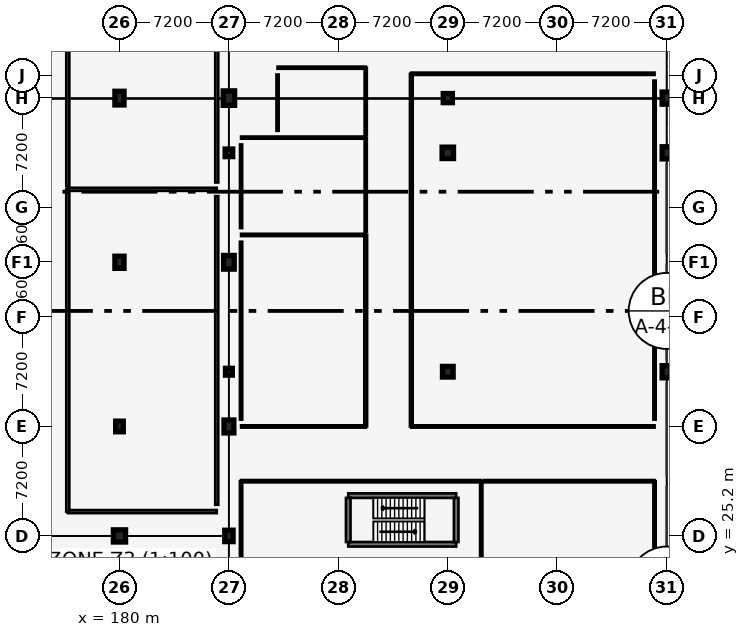
"""IFC4 building model, lengths in metres.
Left out: names, types, materials, properties, quantities, classifications, styles, units other than length and angle.
Written with IfcOpenShell. Run it as: python <this file> out.ifc"""

import sys

from ifc_helpers import new_model, si_unit, direction, frame, frame_2d, origin, origin_2d, place, context, subcontext, project, spatial, rectangle, extrude, element, fill, save


model = new_model("IFC4")
c1 = context("Model", 3, precision=1e-05, world=origin(), true_north=direction((0.0, 1.0)))
c2 = subcontext(c1, "Body", "Model", "MODEL_VIEW")
j1 = project(units=[si_unit("LENGTHUNIT", "METRE"), si_unit("PLANEANGLEUNIT", "RADIAN")], contexts=[c1])
p1 = place(None, origin())
s1 = spatial("IfcSite", under=j1, at=p1, CompositionType="ELEMENT")
p2 = place(p1, origin())
s2 = spatial("IfcBuilding", under=s1, at=p2, CompositionType="ELEMENT")
p3 = place(p2, origin())
s3 = spatial("IfcBuildingStorey", under=s2, at=p3, CompositionType="ELEMENT", Elevation=0.0)
p4 = place(p3, frame((180.0, 25.2, 0.0), z_axis=(0.0, 0.0, 1.0), x_axis=(1.0, 0.0, 0.0)))
e1 = element("IfcColumn", 1, at=p4, inside=s3, PredefinedType="COLUMN", context=c2, shape_type="SweptSolid", body=[
    extrude(rectangle(XDim=0.8, YDim=0.8, at=origin_2d()), origin(), (0.0, 0.0, 1.0), 4.8),
])
p5 = place(p3, frame((180.0, 32.4, 0.0), z_axis=(0.0, 0.0, 1.0), x_axis=(1.0, 0.0, 0.0)))
e2 = element("IfcColumn", 2, at=p5, inside=s3, PredefinedType="COLUMN", context=c2, shape_type="SweptSolid", body=[
    extrude(rectangle(XDim=0.5, YDim=0.7, at=origin_2d()), origin(), (0.0, 0.0, 1.0), 4.8),
])
p6 = place(p3, frame((180.0, 43.2, 0.0), z_axis=(0.0, 0.0, 1.0), x_axis=(1.0, 0.0, 0.0)))
e3 = element("IfcColumn", 3, at=p6, inside=s3, PredefinedType="COLUMN", context=c2, shape_type="SweptSolid", body=[
    extrude(rectangle(XDim=0.6, YDim=0.8, at=origin_2d()), origin(), (0.0, 0.0, 1.0), 4.8),
])
p7 = place(p3, frame((180.0, 54.0, 0.0), z_axis=(0.0, 0.0, 1.0), x_axis=(1.0, 0.0, 0.0)))
e4 = element("IfcColumn", 4, at=p7, inside=s3, PredefinedType="COLUMN", context=c2, shape_type="SweptSolid", body=[
    extrude(rectangle(XDim=0.6, YDim=0.9, at=origin_2d()), origin(), (0.0, 0.0, 1.0), 4.8),
])
p8 = place(p3, frame((187.2, 25.2, 0.0), z_axis=(0.0, 0.0, 1.0), x_axis=(1.0, 0.0, 0.0)))
e5 = element("IfcColumn", 5, at=p8, inside=s3, PredefinedType="COLUMN", context=c2, shape_type="SweptSolid", body=[
    extrude(rectangle(XDim=0.55, YDim=0.75, at=origin_2d()), origin(), (0.0, 0.0, 1.0), 4.8),
])
p9 = place(p3, frame((187.2, 32.4, 0.0), z_axis=(0.0, 0.0, 1.0), x_axis=(1.0, 0.0, 0.0)))
e6 = element("IfcColumn", 6, at=p9, inside=s3, PredefinedType="COLUMN", context=c2, shape_type="SweptSolid", body=[
    extrude(rectangle(XDim=0.65, YDim=0.85, at=origin_2d()), origin(), (0.0, 0.0, 1.0), 4.8),
])
p10 = place(p3, frame((187.2, 36.0, 0.0), z_axis=(0.0, 0.0, 1.0), x_axis=(1.0, 0.0, 0.0)))
e7 = element("IfcColumn", 7, at=p10, inside=s3, PredefinedType="COLUMN", context=c2, shape_type="SweptSolid", body=[
    extrude(rectangle(XDim=0.45, YDim=0.45, at=origin_2d()), origin(), (0.0, 0.0, 1.0), 4.8),
])
p11 = place(p3, frame((187.2, 43.2, 0.0), z_axis=(0.0, 0.0, 1.0), x_axis=(1.0, 0.0, 0.0)))
e8 = element("IfcColumn", 8, at=p11, inside=s3, PredefinedType="COLUMN", context=c2, shape_type="SweptSolid", body=[
    extrude(rectangle(XDim=0.7, YDim=0.9, at=origin_2d()), origin(), (0.0, 0.0, 1.0), 4.8),
])
p12 = place(p3, frame((187.2, 50.4, 0.0), z_axis=(0.0, 0.0, 1.0), x_axis=(1.0, 0.0, 0.0)))
e9 = element("IfcColumn", 9, at=p12, inside=s3, PredefinedType="COLUMN", context=c2, shape_type="SweptSolid", body=[
    extrude(rectangle(XDim=0.5, YDim=0.5, at=origin_2d()), origin(), (0.0, 0.0, 1.0), 4.8),
])
p13 = place(p3, frame((187.2, 54.0, 0.0), z_axis=(0.0, 0.0, 1.0), x_axis=(1.0, 0.0, 0.0)))
e10 = element("IfcColumn", 10, at=p13, inside=s3, PredefinedType="COLUMN", context=c2, shape_type="SweptSolid", body=[
    extrude(rectangle(XDim=0.75, YDim=0.95, at=origin_2d()), origin(), (0.0, 0.0, 1.0), 4.8),
])
p14 = place(p3, frame((201.6, 36.0, 0.0), z_axis=(0.0, 0.0, 1.0), x_axis=(1.0, 0.0, 0.0)))
e11 = element("IfcColumn", 11, at=p14, inside=s3, PredefinedType="COLUMN", context=c2, shape_type="SweptSolid", body=[
    extrude(rectangle(XDim=0.7, YDim=0.7, at=origin_2d()), origin(), (0.0, 0.0, 1.0), 4.8),
])
p15 = place(p3, frame((201.6, 50.4, 0.0), z_axis=(0.0, 0.0, 1.0), x_axis=(1.0, 0.0, 0.0)))
e12 = element("IfcColumn", 12, at=p15, inside=s3, PredefinedType="COLUMN", context=c2, shape_type="SweptSolid", body=[
    extrude(rectangle(XDim=0.75, YDim=0.75, at=origin_2d()), origin(), (0.0, 0.0, 1.0), 4.8),
])
p16 = place(p3, frame((201.6, 54.0, 0.0), z_axis=(0.0, 0.0, 1.0), x_axis=(1.0, 0.0, 0.0)))
e13 = element("IfcColumn", 13, at=p16, inside=s3, PredefinedType="COLUMN", context=c2, shape_type="SweptSolid", body=[
    extrude(rectangle(XDim=0.6, YDim=0.6, at=origin_2d()), origin(), (0.0, 0.0, 1.0), 4.8),
])
for number, where, z_axis, x_axis in (
    (14, (216.0, 36.0, 0.0), (0.0, 0.0, 1.0), (1.0, 0.0, 0.0)),
    (15, (216.0, 50.4, 0.0), (0.0, 0.0, 1.0), (1.0, 0.0, 0.0)),
    (16, (216.0, 54.0, 0.0), (0.0, 0.0, 1.0), (1.0, 0.0, 0.0)),
):
    element("IfcColumn", number, at=place(p3, frame(where, z_axis=z_axis, x_axis=x_axis)), inside=s3, PredefinedType="COLUMN", context=c2, shape_type="SweptSolid", body=[
        extrude(rectangle(XDim=0.6, YDim=0.8, at=origin_2d()), origin(), (0.0, 0.0, 1.0), 4.8),
    ])
p17 = place(p3, frame((195.05, 24.65, 0.0), z_axis=(0.0, 0.0, 1.0), x_axis=(1.0, 0.0, 0.0)))
e17 = element("IfcWall", 17, at=p17, inside=s3, PredefinedType="SHEAR", context=c2, shape_type="SweptSolid", body=[
    extrude(rectangle(XDim=7.1, YDim=0.3, at=frame_2d((3.55, 0.0))), origin(), (0.0, 0.0, 1.0), 4.55),
])
p18 = place(p3, frame((202.15, 27.85, 0.0), z_axis=(0.0, 0.0, 1.0), x_axis=(-1.0, 0.0, 0.0)))
e18 = element("IfcWall", 18, at=p18, inside=s3, PredefinedType="SHEAR", context=c2, shape_type="SweptSolid", body=[
    extrude(rectangle(XDim=7.1, YDim=0.3, at=frame_2d((3.55, 0.0))), origin(), (0.0, 0.0, 1.0), 4.55),
])
p19 = place(p18, frame((5.6, 0.0, 0.0)))
e19 = element("IfcOpeningElement", 19, at=p19, cuts=e18, PredefinedType="OPENING", context=c2, shape_type="SweptSolid", body=[
    extrude(rectangle(XDim=1.05, YDim=2.15, at=frame_2d((0.525, 1.075))), frame((0.0, 0.16, 0.0), z_axis=(0.0, -1.0, 0.0), x_axis=(1.0, 0.0, 0.0)), (0.0, 0.0, 1.0), 0.32),
])
for number, where, z_axis, x_axis in (
    (20, (202.15, 24.8, 0.0), (0.0, 0.0, 1.0), (0.0, 1.0, 0.0)),
    (21, (195.05, 27.7, 0.0), (0.0, 0.0, 1.0), (0.0, -1.0, 0.0)),
):
    element("IfcWall", number, at=place(p3, frame(where, z_axis=z_axis, x_axis=x_axis)), inside=s3, PredefinedType="SHEAR", context=c2, shape_type="SweptSolid", body=[
        extrude(rectangle(XDim=2.9, YDim=0.3, at=frame_2d((1.45, 0.0))), origin(), (0.0, 0.0, 1.0), 4.55),
    ])
p20 = place(p3, frame((176.6, 48.0, 0.0), z_axis=(0.0, 0.0, 1.0), x_axis=(1.0, 0.0, 0.0)))
e22 = element("IfcWall", 22, at=p20, inside=s3, PredefinedType="SOLIDWALL", context=c2, shape_type="SweptSolid", body=[
    extrude(rectangle(XDim=9.8, YDim=0.2, at=frame_2d((4.9, 0.0))), origin(), (0.0, 0.0, 1.0), 4.0),
])
p21 = place(p3, frame((186.4, 26.8, 0.0), z_axis=(0.0, 0.0, 1.0), x_axis=(-1.0, 0.0, 0.0)))
e23 = element("IfcWall", 23, at=p21, inside=s3, PredefinedType="SOLIDWALL", context=c2, shape_type="SweptSolid", body=[
    extrude(rectangle(XDim=9.8, YDim=0.2, at=frame_2d((4.9, 0.0))), origin(), (0.0, 0.0, 1.0), 3.557),
])
p22 = place(p3, frame((186.4, 27.25, 0.0), z_axis=(0.0, 0.0, 1.0), x_axis=(0.0, 1.0, 0.0)))
e24 = element("IfcWall", 24, at=p22, inside=s3, PredefinedType="SOLIDWALL", context=c2, shape_type="SweptSolid", body=[
    extrude(rectangle(XDim=20.3, YDim=0.2, at=frame_2d((10.15, 0.0))), origin(), (0.0, 0.0, 1.0), 3.657),
])
p23 = place(p3, frame((176.6, 48.0, 0.0), z_axis=(0.0, 0.0, 1.0), x_axis=(0.0, -1.0, 0.0)))
e25 = element("IfcWall", 25, at=p23, inside=s3, PredefinedType="SOLIDWALL", context=c2, shape_type="SweptSolid", body=[
    extrude(rectangle(XDim=21.2, YDim=0.2, at=frame_2d((10.6, 0.0))), origin(), (0.0, 0.0, 1.0), 3.757),
])
p24 = place(p23, frame((9.7, 0.0, 0.0)))
e26 = element("IfcOpeningElement", 26, at=p24, cuts=e25, PredefinedType="OPENING", context=c2, shape_type="SweptSolid", body=[
    extrude(rectangle(XDim=1.8, YDim=2.2, at=frame_2d((0.9, 1.1))), frame((0.0, 0.11, 0.0), z_axis=(0.0, -1.0, 0.0), x_axis=(1.0, 0.0, 0.0)), (0.0, 0.0, 1.0), 0.22),
])
p25 = place(p3, frame((186.4, 48.45, 0.0), z_axis=(0.0, 0.0, 1.0), x_axis=(0.0, 1.0, 0.0)))
e27 = element("IfcWall", 27, at=p25, inside=s3, PredefinedType="SOLIDWALL", context=c2, shape_type="SweptSolid", body=[
    extrude(rectangle(XDim=14.9, YDim=0.2, at=frame_2d((7.45, 0.0))), origin(), (0.0, 0.0, 1.0), 4.0),
])
p26 = place(p3, frame((176.6, 63.8, 0.0), z_axis=(0.0, 0.0, 1.0), x_axis=(0.0, -1.0, 0.0)))
e28 = element("IfcWall", 28, at=p26, inside=s3, PredefinedType="SOLIDWALL", context=c2, shape_type="SweptSolid", body=[
    extrude(rectangle(XDim=15.6, YDim=0.2, at=frame_2d((7.8, 0.0))), origin(), (0.0, 0.0, 1.0), 4.0),
])
p27 = place(p26, frame((6.9, 0.0, 0.0)))
e29 = element("IfcOpeningElement", 29, at=p27, cuts=e28, PredefinedType="OPENING", context=c2, shape_type="SweptSolid", body=[
    extrude(rectangle(XDim=1.8, YDim=2.2, at=frame_2d((0.9, 1.1))), frame((0.0, 0.11, 0.0), z_axis=(0.0, -1.0, 0.0), x_axis=(1.0, 0.0, 0.0)), (0.0, 0.0, 1.0), 0.22),
])
for number, where, z_axis, x_axis in (
    (30, (203.8, 8.45, 0.0), (0.0, 0.0, 1.0), (0.0, 1.0, 0.0)),
    (31, (188.0, 28.8, 0.0), (0.0, 0.0, 1.0), (0.0, -1.0, 0.0)),
):
    element("IfcWall", number, at=place(p3, frame(where, z_axis=z_axis, x_axis=x_axis)), inside=s3, PredefinedType="PARTITIONING", context=c2, shape_type="SweptSolid", body=[
        extrude(rectangle(XDim=20.35, YDim=0.15, at=frame_2d((10.175, 0.0))), origin(), (0.0, 0.0, 1.0), 3.92),
    ])
p28 = place(p3, frame((188.0, 28.8, 0.0), z_axis=(0.0, 0.0, 1.0), x_axis=(1.0, 0.0, 0.0)))
e32 = element("IfcWall", 32, at=p28, inside=s3, PredefinedType="PARTITIONING", context=c2, shape_type="SweptSolid", body=[
    extrude(rectangle(XDim=15.8, YDim=0.15, at=frame_2d((7.9, 0.0))), origin(), (0.0, 0.0, 1.0), 4.1),
])
p29 = place(p28, frame((7.0, 0.0, 0.0)))
e33 = element("IfcOpeningElement", 33, at=p29, cuts=e32, PredefinedType="OPENING", context=c2, shape_type="SweptSolid", body=[
    extrude(rectangle(XDim=1.8, YDim=2.2, at=frame_2d((0.9, 1.1))), frame((0.0, 0.085, 0.0), z_axis=(0.0, -1.0, 0.0), x_axis=(1.0, 0.0, 0.0)), (0.0, 0.0, 1.0), 0.17),
])
p30 = place(p3, frame((215.2, 8.45, 0.0), z_axis=(0.0, 0.0, 1.0), x_axis=(0.0, 1.0, 0.0)))
e34 = element("IfcWall", 34, at=p30, inside=s3, PredefinedType="PARTITIONING", context=c2, shape_type="SweptSolid", body=[
    extrude(rectangle(XDim=20.35, YDim=0.15, at=frame_2d((10.175, 0.0))), origin(), (0.0, 0.0, 1.0), 3.92),
])
p31 = place(p3, frame((204.0, 28.8, 0.0), z_axis=(0.0, 0.0, 1.0), x_axis=(1.0, 0.0, 0.0)))
e35 = element("IfcWall", 35, at=p31, inside=s3, PredefinedType="PARTITIONING", context=c2, shape_type="SweptSolid", body=[
    extrude(rectangle(XDim=11.2, YDim=0.15, at=frame_2d((5.6, 0.0))), origin(), (0.0, 0.0, 1.0), 4.1),
])
p32 = place(p31, frame((4.7, 0.0, 0.0)))
e36 = element("IfcOpeningElement", 36, at=p32, cuts=e35, PredefinedType="OPENING", context=c2, shape_type="SweptSolid", body=[
    extrude(rectangle(XDim=1.8, YDim=2.2, at=frame_2d((0.9, 1.1))), frame((0.0, 0.085, 0.0), z_axis=(0.0, -1.0, 0.0), x_axis=(1.0, 0.0, 0.0)), (0.0, 0.0, 1.0), 0.17),
])
p33 = place(p3, frame((199.2, 55.6, 0.0), z_axis=(0.0, 0.0, 1.0), x_axis=(1.0, 0.0, 0.0)))
e37 = element("IfcWall", 37, at=p33, inside=s3, PredefinedType="PARTITIONING", context=c2, shape_type="SweptSolid", body=[
    extrude(rectangle(XDim=16.0, YDim=0.15, at=frame_2d((8.0, 0.0))), origin(), (0.0, 0.0, 1.0), 3.882),
])
p34 = place(p3, frame((215.2, 32.4, 0.0), z_axis=(0.0, 0.0, 1.0), x_axis=(-1.0, 0.0, 0.0)))
e38 = element("IfcWall", 38, at=p34, inside=s3, PredefinedType="PARTITIONING", context=c2, shape_type="SweptSolid", body=[
    extrude(rectangle(XDim=16.0, YDim=0.15, at=frame_2d((8.0, 0.0))), origin(), (0.0, 0.0, 1.0), 4.1),
])
p35 = place(p3, frame((215.2, 32.85, 0.0), z_axis=(0.0, 0.0, 1.0), x_axis=(0.0, 1.0, 0.0)))
e39 = element("IfcWall", 39, at=p35, inside=s3, PredefinedType="PARTITIONING", context=c2, shape_type="SweptSolid", body=[
    extrude(rectangle(XDim=22.3, YDim=0.15, at=frame_2d((11.15, 0.0))), origin(), (0.0, 0.0, 1.0), 3.92),
])
p36 = place(p3, frame((199.2, 55.6, 0.0), z_axis=(0.0, 0.0, 1.0), x_axis=(0.0, -1.0, 0.0)))
e40 = element("IfcWall", 40, at=p36, inside=s3, PredefinedType="SOLIDWALL", context=c2, shape_type="SweptSolid", body=[
    extrude(rectangle(XDim=23.2, YDim=0.18, at=frame_2d((11.6, 0.0))), origin(), (0.0, 0.0, 1.0), 3.92),
])
p37 = place(p36, frame((11.1, 0.0, 0.0)))
e41 = element("IfcOpeningElement", 41, at=p37, cuts=e40, PredefinedType="OPENING", context=c2, shape_type="SweptSolid", body=[
    extrude(rectangle(XDim=1.0, YDim=2.15, at=frame_2d((0.5, 1.075))), frame((0.0, 0.1, 0.0), z_axis=(0.0, -1.0, 0.0), x_axis=(1.0, 0.0, 0.0)), (0.0, 0.0, 1.0), 0.2),
])
for number, where, z_axis, x_axis in (
    (42, (188.0, 45.0, 0.0), (0.0, 0.0, 1.0), (1.0, 0.0, 0.0)),
    (43, (196.2, 32.4, 0.0), (0.0, 0.0, 1.0), (-1.0, 0.0, 0.0)),
):
    element("IfcWall", number, at=place(p3, frame(where, z_axis=z_axis, x_axis=x_axis)), inside=s3, PredefinedType="PARTITIONING", context=c2, shape_type="SweptSolid", body=[
        extrude(rectangle(XDim=8.2, YDim=0.15, at=frame_2d((4.1, 0.0))), origin(), (0.0, 0.0, 1.0), 4.1),
    ])
p38 = place(p3, frame((188.0, 44.55, 0.0), z_axis=(0.0, 0.0, 1.0), x_axis=(0.0, -1.0, 0.0)))
e44 = element("IfcWall", 44, at=p38, inside=s3, PredefinedType="PARTITIONING", context=c2, shape_type="SweptSolid", body=[
    extrude(rectangle(XDim=11.7, YDim=0.15, at=frame_2d((5.85, 0.0))), origin(), (0.0, 0.0, 1.0), 3.92),
])
p39 = place(p3, frame((196.2, 32.4, 0.0), z_axis=(0.0, 0.0, 1.0), x_axis=(0.0, 1.0, 0.0)))
e45 = element("IfcWall", 45, at=p39, inside=s3, PredefinedType="SOLIDWALL", context=c2, shape_type="SweptSolid", body=[
    extrude(rectangle(XDim=12.6, YDim=0.18, at=frame_2d((6.3, 0.0))), origin(), (0.0, 0.0, 1.0), 3.92),
])
p40 = place(p39, frame((5.79, 0.0, 0.0)))
e46 = element("IfcOpeningElement", 46, at=p40, cuts=e45, PredefinedType="OPENING", context=c2, shape_type="SweptSolid", body=[
    extrude(rectangle(XDim=1.02, YDim=2.15, at=frame_2d((0.51, 1.075))), frame((0.0, 0.1, 0.0), z_axis=(0.0, -1.0, 0.0), x_axis=(1.0, 0.0, 0.0)), (0.0, 0.0, 1.0), 0.2),
])
p41 = place(p3, frame((188.0, 51.4, 0.0), z_axis=(0.0, 0.0, 1.0), x_axis=(1.0, 0.0, 0.0)))
e47 = element("IfcWall", 47, at=p41, inside=s3, PredefinedType="PARTITIONING", context=c2, shape_type="SweptSolid", body=[
    extrude(rectangle(XDim=8.2, YDim=0.14, at=frame_2d((4.1, 0.0))), origin(), (0.0, 0.0, 1.0), 3.8),
])
p42 = place(p3, frame((188.0, 50.95, 0.0), z_axis=(0.0, 0.0, 1.0), x_axis=(0.0, -1.0, 0.0)))
e48 = element("IfcWall", 48, at=p42, inside=s3, PredefinedType="PARTITIONING", context=c2, shape_type="SweptSolid", body=[
    extrude(rectangle(XDim=5.5, YDim=0.14, at=frame_2d((2.75, 0.0))), origin(), (0.0, 0.0, 1.0), 3.8),
])
p43 = place(p3, frame((196.2, 45.2, 0.0), z_axis=(0.0, 0.0, 1.0), x_axis=(0.0, 1.0, 0.0)))
e49 = element("IfcWall", 49, at=p43, inside=s3, PredefinedType="PARTITIONING", context=c2, shape_type="SweptSolid", body=[
    extrude(rectangle(XDim=6.2, YDim=0.14, at=frame_2d((3.1, 0.0))), origin(), (0.0, 0.0, 1.0), 3.8),
])
p44 = place(p43, frame((2.61, 0.0, 0.0)))
e50 = element("IfcOpeningElement", 50, at=p44, cuts=e49, PredefinedType="OPENING", context=c2, shape_type="SweptSolid", body=[
    extrude(rectangle(XDim=0.98, YDim=2.15, at=frame_2d((0.49, 1.075))), frame((0.0, 0.08, 0.0), z_axis=(0.0, -1.0, 0.0), x_axis=(1.0, 0.0, 0.0)), (0.0, 0.0, 1.0), 0.16),
])
p45 = place(p3, frame((190.4, 56.0, 0.0), z_axis=(0.0, 0.0, 1.0), x_axis=(1.0, 0.0, 0.0)))
e51 = element("IfcWall", 51, at=p45, inside=s3, PredefinedType="PARTITIONING", context=c2, shape_type="SweptSolid", body=[
    extrude(rectangle(XDim=5.8, YDim=0.14, at=frame_2d((2.9, 0.0))), origin(), (0.0, 0.0, 1.0), 3.8),
])
p46 = place(p3, frame((190.4, 55.55, 0.0), z_axis=(0.0, 0.0, 1.0), x_axis=(0.0, -1.0, 0.0)))
e52 = element("IfcWall", 52, at=p46, inside=s3, PredefinedType="PARTITIONING", context=c2, shape_type="SweptSolid", body=[
    extrude(rectangle(XDim=3.7, YDim=0.14, at=frame_2d((1.85, 0.0))), origin(), (0.0, 0.0, 1.0), 3.8),
])
p47 = place(p3, frame((196.2, 51.6, 0.0), z_axis=(0.0, 0.0, 1.0), x_axis=(0.0, 1.0, 0.0)))
e53 = element("IfcWall", 53, at=p47, inside=s3, PredefinedType="PARTITIONING", context=c2, shape_type="SweptSolid", body=[
    extrude(rectangle(XDim=4.4, YDim=0.14, at=frame_2d((2.2, 0.0))), origin(), (0.0, 0.0, 1.0), 3.8),
])
p48 = place(p47, frame((1.705, 0.0, 0.0)))
e54 = element("IfcOpeningElement", 54, at=p48, cuts=e53, PredefinedType="OPENING", context=c2, shape_type="SweptSolid", body=[
    extrude(rectangle(XDim=0.99, YDim=2.15, at=frame_2d((0.495, 1.075))), frame((0.0, 0.08, 0.0), z_axis=(0.0, -1.0, 0.0), x_axis=(1.0, 0.0, 0.0)), (0.0, 0.0, 1.0), 0.16),
])
p49 = place(p19, frame((1.05, 0.0, 0.0), z_axis=(0.0, 0.0, 1.0), x_axis=(-1.0, 0.0, 0.0)))
e55 = element("IfcDoor", 55, at=p49, inside=s3, OperationType="SINGLE_SWING_LEFT", PredefinedType="DOOR", context=c2, shape_type="SweptSolid", body=[
    extrude(rectangle(XDim=1.05, YDim=2.15, at=frame_2d((0.525, 1.075))), frame((0.0, 0.025, 0.0), z_axis=(0.0, -1.0, 0.0), x_axis=(1.0, 0.0, 0.0)), (0.0, 0.0, 1.0), 0.05),
])
fill(e19, e55)
p50 = place(p24, origin())
e56 = element("IfcDoor", 56, at=p50, inside=s3, OperationType="DOUBLE_SWING_LEFT", PredefinedType="DOOR", context=c2, shape_type="SweptSolid", body=[
    extrude(rectangle(XDim=1.8, YDim=2.2, at=frame_2d((0.9, 1.1))), frame((0.0, 0.025, 0.0), z_axis=(0.0, -1.0, 0.0), x_axis=(1.0, 0.0, 0.0)), (0.0, 0.0, 1.0), 0.05),
])
fill(e26, e56)
p51 = place(p27, origin())
e57 = element("IfcDoor", 57, at=p51, inside=s3, OperationType="DOUBLE_SWING_LEFT", PredefinedType="DOOR", context=c2, shape_type="SweptSolid", body=[
    extrude(rectangle(XDim=1.8, YDim=2.2, at=frame_2d((0.9, 1.1))), frame((0.0, 0.025, 0.0), z_axis=(0.0, -1.0, 0.0), x_axis=(1.0, 0.0, 0.0)), (0.0, 0.0, 1.0), 0.05),
])
fill(e29, e57)
p52 = place(p29, origin())
e58 = element("IfcDoor", 58, at=p52, inside=s3, OperationType="DOUBLE_SWING_RIGHT", PredefinedType="DOOR", context=c2, shape_type="SweptSolid", body=[
    extrude(rectangle(XDim=1.8, YDim=2.2, at=frame_2d((0.9, 1.1))), frame((0.0, 0.025, 0.0), z_axis=(0.0, -1.0, 0.0), x_axis=(1.0, 0.0, 0.0)), (0.0, 0.0, 1.0), 0.05),
])
fill(e33, e58)
p53 = place(p32, origin())
e59 = element("IfcDoor", 59, at=p53, inside=s3, OperationType="DOUBLE_SWING_RIGHT", PredefinedType="DOOR", context=c2, shape_type="SweptSolid", body=[
    extrude(rectangle(XDim=1.8, YDim=2.2, at=frame_2d((0.9, 1.1))), frame((0.0, 0.025, 0.0), z_axis=(0.0, -1.0, 0.0), x_axis=(1.0, 0.0, 0.0)), (0.0, 0.0, 1.0), 0.05),
])
fill(e36, e59)
p54 = place(p37, origin())
e60 = element("IfcDoor", 60, at=p54, inside=s3, OperationType="SINGLE_SWING_LEFT", PredefinedType="DOOR", context=c2, shape_type="SweptSolid", body=[
    extrude(rectangle(XDim=1.0, YDim=2.15, at=frame_2d((0.5, 1.075))), frame((0.0, 0.025, 0.0), z_axis=(0.0, -1.0, 0.0), x_axis=(1.0, 0.0, 0.0)), (0.0, 0.0, 1.0), 0.05),
])
fill(e41, e60)
p55 = place(p40, origin())
e61 = element("IfcDoor", 61, at=p55, inside=s3, OperationType="SINGLE_SWING_RIGHT", PredefinedType="DOOR", context=c2, shape_type="SweptSolid", body=[
    extrude(rectangle(XDim=1.02, YDim=2.15, at=frame_2d((0.51, 1.075))), frame((0.0, 0.025, 0.0), z_axis=(0.0, -1.0, 0.0), x_axis=(1.0, 0.0, 0.0)), (0.0, 0.0, 1.0), 0.05),
])
fill(e46, e61)
p56 = place(p44, origin())
e62 = element("IfcDoor", 62, at=p56, inside=s3, OperationType="SINGLE_SWING_LEFT", PredefinedType="DOOR", context=c2, shape_type="SweptSolid", body=[
    extrude(rectangle(XDim=0.98, YDim=2.15, at=frame_2d((0.49, 1.075))), frame((0.0, 0.025, 0.0), z_axis=(0.0, -1.0, 0.0), x_axis=(1.0, 0.0, 0.0)), (0.0, 0.0, 1.0), 0.05),
])
fill(e50, e62)
p57 = place(p48, origin())
e63 = element("IfcDoor", 63, at=p57, inside=s3, OperationType="SINGLE_SWING_RIGHT", PredefinedType="DOOR", context=c2, shape_type="SweptSolid", body=[
    extrude(rectangle(XDim=0.99, YDim=2.15, at=frame_2d((0.495, 1.075))), frame((0.0, 0.025, 0.0), z_axis=(0.0, -1.0, 0.0), x_axis=(1.0, 0.0, 0.0)), (0.0, 0.0, 1.0), 0.05),
])
fill(e54, e63)
save(model, sys.argv[1])
